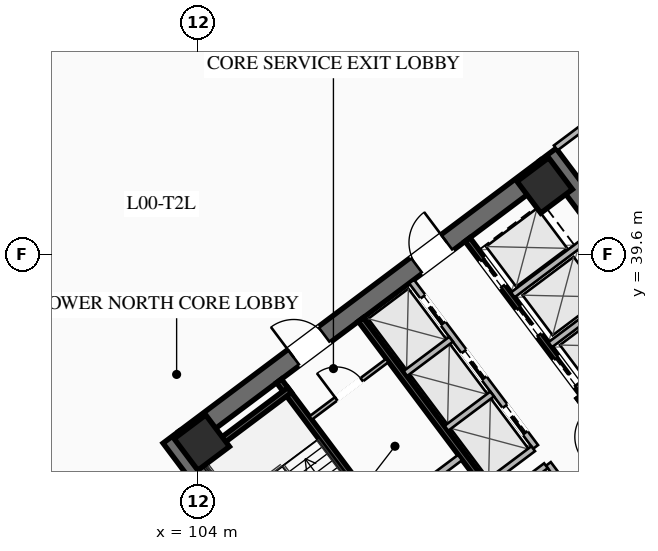
"""IFC4 building model, lengths in metres.
Left out: names, types, materials, properties, quantities, classifications, styles, units other than length and angle.
Written with IfcOpenShell. Run it as: python <this file> out.ifc"""

import sys

from ifc_helpers import new_model, si_unit, direction, frame, frame_2d, origin, origin_2d, place, context, subcontext, project, spatial, rectangle, hollow_rectangle, extrude, element, fill, save


model = new_model("IFC4")
c1 = context("Model", 3, precision=1e-05, world=origin(), true_north=direction((0.0, 1.0)))
c2 = subcontext(c1, "Body", "Model", "MODEL_VIEW")
j1 = project(units=[si_unit("LENGTHUNIT", "METRE"), si_unit("PLANEANGLEUNIT", "RADIAN")], contexts=[c1])
p1 = place(None, origin())
s1 = spatial("IfcSite", under=j1, at=p1, CompositionType="ELEMENT")
p2 = place(p1, origin())
s2 = spatial("IfcBuilding", under=s1, at=p2, CompositionType="ELEMENT")
p3 = place(p2, origin())
s3 = spatial("IfcBuildingStorey", under=s2, at=p3, CompositionType="ELEMENT", Elevation=0.0)
for number, where, z_axis, x_axis in (
    (1, (112.476, 21.107, 0.0), (0.0, 0.0, 1.0), (-0.6, 0.8, 0.0)),
    (2, (115.524, 42.893, 0.0), (0.0, 0.0, 1.0), (0.6, -0.8, 0.0)),
):
    element("IfcWall", number, at=place(p3, frame(where, z_axis=z_axis, x_axis=x_axis)), inside=s3, PredefinedType="SHEAR", context=c2, shape_type="SweptSolid", body=[
        extrude(rectangle(XDim=15.6, YDim=0.65, at=frame_2d((7.8, 0.0))), origin(), (0.0, 0.0, 1.0), 5.4),
    ])
p4 = place(p3, frame((103.571, 33.522, 0.0), z_axis=(0.0, 0.0, 1.0), x_axis=(0.799998028465, 0.600002628705, 0.0)))
e3 = element("IfcWall", 3, at=p4, inside=s3, PredefinedType="SHEAR", context=c2, shape_type="SweptSolid", body=[
    extrude(rectangle(XDim=14.86, YDim=0.65, at=frame_2d((7.43, 0.0))), origin(), (0.0, 0.0, 1.0), 5.4),
])
p5 = place(p4, frame((4.48, 0.0, 0.0)))
e4 = element("IfcOpeningElement", 4, at=p5, cuts=e3, PredefinedType="OPENING", context=c2, shape_type="SweptSolid", body=[
    extrude(rectangle(XDim=1.25, YDim=2.25, at=frame_2d((0.625, 1.125))), frame((0.0, 0.335, 0.0), z_axis=(0.0, -1.0, 0.0), x_axis=(1.0, 0.0, 0.0)), (0.0, 0.0, 1.0), 0.67),
])
p6 = place(p4, frame((9.53, 0.0, 0.0)))
e5 = element("IfcOpeningElement", 5, at=p6, cuts=e3, PredefinedType="OPENING", context=c2, shape_type="SweptSolid", body=[
    extrude(rectangle(XDim=1.25, YDim=2.25, at=frame_2d((0.625, 1.125))), frame((0.0, 0.335, 0.0), z_axis=(0.0, -1.0, 0.0), x_axis=(1.0, 0.0, 0.0)), (0.0, 0.0, 1.0), 0.67),
])
for number, where, z_axis, x_axis in (
    (6, (115.41, 41.87, 0.0), (0.0, 0.0, 1.0), (0.8, 0.6, 0.0)),
    (7, (104.13, 33.41, 0.0), (0.0, 0.0, 1.0), (0.8, 0.6, 0.0)),
):
    element("IfcColumn", number, at=place(p3, frame(where, z_axis=z_axis, x_axis=x_axis)), inside=s3, PredefinedType="COLUMN", context=c2, shape_type="SweptSolid", body=[
        extrude(hollow_rectangle(XDim=1.3, YDim=1.3, WallThickness=0.05, at=origin_2d()), origin(), (0.0, 0.0, 1.0), 5.14),
    ])
p7 = place(p3, frame((106.67, 35.44, 0.0), z_axis=(0.0, 0.0, 1.0), x_axis=(0.600009827119, -0.799992629566, 0.0)))
e8 = element("IfcWall", 8, at=p7, inside=s3, PredefinedType="SHEAR", context=c2, shape_type="SweptSolid", body=[
    extrude(rectangle(XDim=7.95, YDim=0.2, at=frame_2d((3.975, 0.0))), origin(), (0.0, 0.0, 1.0), 5.14),
])
p8 = place(p7, frame((6.3, 0.0, 0.0)))
e9 = element("IfcOpeningElement", 9, at=p8, cuts=e8, PredefinedType="OPENING", context=c2, shape_type="SweptSolid", body=[
    extrude(rectangle(XDim=1.15, YDim=2.2, at=frame_2d((0.575, 1.1))), frame((0.0, 0.11, 0.0), z_axis=(0.0, -1.0, 0.0), x_axis=(1.0, 0.0, 0.0)), (0.0, 0.0, 1.0), 0.22),
])
p9 = place(p3, frame((104.036, 32.902, 0.0), z_axis=(0.0, 0.0, 1.0), x_axis=(0.800039270442, 0.59994763584, 0.0)))
e10 = element("IfcWall", 10, at=p9, inside=s3, PredefinedType="SHEAR", context=c2, shape_type="SweptSolid", body=[
    extrude(rectangle(XDim=3.73, YDim=0.2, at=frame_2d((1.865, 0.0))), origin(), (0.0, 0.0, 1.0), 5.14),
])
p10 = place(p3, frame((121.33, 28.56, 0.0), z_axis=(0.0, 0.0, 1.0), x_axis=(-0.600009827119, 0.799992629566, 0.0)))
e11 = element("IfcWall", 11, at=p10, inside=s3, PredefinedType="SHEAR", context=c2, shape_type="SweptSolid", body=[
    extrude(rectangle(XDim=7.95, YDim=0.2, at=frame_2d((3.975, 0.0))), origin(), (0.0, 0.0, 1.0), 5.14),
])
p11 = place(p10, frame((6.3, 0.0, 0.0)))
e12 = element("IfcOpeningElement", 12, at=p11, cuts=e11, PredefinedType="OPENING", context=c2, shape_type="SweptSolid", body=[
    extrude(rectangle(XDim=1.15, YDim=2.2, at=frame_2d((0.575, 1.1))), frame((0.0, 0.11, 0.0), z_axis=(0.0, -1.0, 0.0), x_axis=(1.0, 0.0, 0.0)), (0.0, 0.0, 1.0), 0.22),
])
p12 = place(p3, frame((116.54, 34.78, 0.0), z_axis=(0.0, 0.0, 1.0), x_axis=(0.799984290658, 0.600020945218, 0.0)))
e13 = element("IfcWall", 13, at=p12, inside=s3, PredefinedType="SHEAR", context=c2, shape_type="SweptSolid", body=[
    extrude(rectangle(XDim=3.73, YDim=0.2, at=frame_2d((1.865, 0.0))), origin(), (0.0, 0.0, 1.0), 5.14),
])
p13 = place(p3, frame((117.938, 26.016, 0.0), z_axis=(0.0, 0.0, 1.0), x_axis=(-0.600005463273, 0.799995902516, 0.0)))
e14 = element("IfcWall", 14, at=p13, inside=s3, PredefinedType="SHEAR", context=c2, shape_type="SweptSolid", body=[
    extrude(rectangle(XDim=14.3, YDim=0.2, at=frame_2d((7.15, 0.0))), origin(), (0.0, 0.0, 1.0), 5.14),
])
p14 = place(p3, frame((110.104, 31.028, 0.0), z_axis=(0.0, 0.0, 1.0), x_axis=(0.800018601094, 0.59997519774, 0.0)))
e15 = element("IfcWall", 15, at=p14, inside=s3, PredefinedType="SOLIDWALL", context=c2, shape_type="SweptSolid", body=[
    extrude(rectangle(XDim=3.15, YDim=0.22, at=frame_2d((1.575, 0.0))), origin(), (0.0, 0.0, 1.0), 3.31),
])
p15 = place(p3, frame((112.87, 40.09, 0.0), z_axis=(0.0, 0.0, 1.0), x_axis=(0.599975393228, -0.800018454488, 0.0)))
e16 = element("IfcWall", 16, at=p15, inside=s3, PredefinedType="SHEAR", context=c2, shape_type="SweptSolid", body=[
    extrude(rectangle(XDim=6.35, YDim=0.2, at=frame_2d((3.175, 0.0))), origin(), (0.0, 0.0, 1.0), 5.14),
])
p16 = place(p15, frame((4.875, 0.0, 0.0)))
e17 = element("IfcOpeningElement", 17, at=p16, cuts=e16, PredefinedType="OPENING", context=c2, shape_type="SweptSolid", body=[
    extrude(rectangle(XDim=1.1, YDim=2.2, at=frame_2d((0.55, 1.1))), frame((0.0, 0.11, 0.0), z_axis=(0.0, -1.0, 0.0), x_axis=(1.0, 0.0, 0.0)), (0.0, 0.0, 1.0), 0.22),
])
p17 = place(p15, frame((2.825, 0.0, 0.0)))
e18 = element("IfcOpeningElement", 18, at=p17, cuts=e16, PredefinedType="OPENING", context=c2, shape_type="SweptSolid", body=[
    extrude(rectangle(XDim=1.1, YDim=2.2, at=frame_2d((0.55, 1.1))), frame((0.0, 0.11, 0.0), z_axis=(0.0, -1.0, 0.0), x_axis=(1.0, 0.0, 0.0)), (0.0, 0.0, 1.0), 0.22),
])
p18 = place(p15, frame((0.825, 0.0, 0.0)))
e19 = element("IfcOpeningElement", 19, at=p18, cuts=e16, PredefinedType="OPENING", context=c2, shape_type="SweptSolid", body=[
    extrude(rectangle(XDim=1.1, YDim=2.2, at=frame_2d((0.55, 1.1))), frame((0.0, 0.11, 0.0), z_axis=(0.0, -1.0, 0.0), x_axis=(1.0, 0.0, 0.0)), (0.0, 0.0, 1.0), 0.22),
])
for number, where, z_axis, x_axis in (
    (20, (115.59, 36.63, 0.0), (0.0, 0.0, 1.0), (0.8, 0.6, 0.0)),
    (21, (114.36, 38.27, 0.0), (0.0, 0.0, 1.0), (0.8, 0.6, 0.0)),
):
    element("IfcWall", number, at=place(p3, frame(where, z_axis=z_axis, x_axis=x_axis)), inside=s3, PredefinedType="SOLIDWALL", context=c2, shape_type="SweptSolid", body=[
        extrude(rectangle(XDim=3.38, YDim=0.2, at=frame_2d((1.69, 0.0))), origin(), (0.0, 0.0, 1.0), 5.14),
    ])
p19 = place(p3, frame((107.71, 34.22, 0.0), z_axis=(0.0, 0.0, 1.0), x_axis=(0.799981399002, 0.60002480053, 0.0)))
e22 = element("IfcWall", 22, at=p19, inside=s3, PredefinedType="PARTITIONING", context=c2, shape_type="SweptSolid", body=[
    extrude(rectangle(XDim=3.15, YDim=0.135, at=frame_2d((1.575, 0.0))), origin(), (0.0, 0.0, 1.0), 3.31),
])
p20 = place(p19, frame((1.05, 0.0, 0.0)))
e23 = element("IfcOpeningElement", 23, at=p20, cuts=e22, PredefinedType="OPENING", context=c2, shape_type="SweptSolid", body=[
    extrude(rectangle(XDim=1.05, YDim=2.2, at=frame_2d((0.525, 1.1))), frame((0.0, 0.077, 0.0), z_axis=(0.0, -1.0, 0.0), x_axis=(1.0, 0.0, 0.0)), (0.0, 0.0, 1.0), 0.155),
])
p21 = place(p3, frame((119.61, 27.27, 0.0), z_axis=(0.0, 0.0, 1.0), x_axis=(-0.600011488909, 0.79999138319, 0.0)))
e24 = element("IfcWall", 24, at=p21, inside=s3, PredefinedType="SOLIDWALL", context=c2, shape_type="SweptSolid", body=[
    extrude(rectangle(XDim=6.8, YDim=0.2, at=frame_2d((3.4, 0.0))), origin(), (0.0, 0.0, 1.0), 5.14),
])
p22 = place(p21, frame((0.625, 0.0, 0.0)))
e25 = element("IfcOpeningElement", 25, at=p22, cuts=e24, PredefinedType="OPENING", context=c2, shape_type="SweptSolid", body=[
    extrude(rectangle(XDim=1.1, YDim=2.2, at=frame_2d((0.55, 1.1))), frame((0.0, 0.11, 0.0), z_axis=(0.0, -1.0, 0.0), x_axis=(1.0, 0.0, 0.0)), (0.0, 0.0, 1.0), 0.22),
])
p23 = place(p21, frame((2.875, 0.0, 0.0)))
e26 = element("IfcOpeningElement", 26, at=p23, cuts=e24, PredefinedType="OPENING", context=c2, shape_type="SweptSolid", body=[
    extrude(rectangle(XDim=1.1, YDim=2.2, at=frame_2d((0.55, 1.1))), frame((0.0, 0.11, 0.0), z_axis=(0.0, -1.0, 0.0), x_axis=(1.0, 0.0, 0.0)), (0.0, 0.0, 1.0), 0.22),
])
p24 = place(p21, frame((5.125, 0.0, 0.0)))
e27 = element("IfcOpeningElement", 27, at=p24, cuts=e24, PredefinedType="OPENING", context=c2, shape_type="SweptSolid", body=[
    extrude(rectangle(XDim=1.1, YDim=2.2, at=frame_2d((0.55, 1.1))), frame((0.0, 0.11, 0.0), z_axis=(0.0, -1.0, 0.0), x_axis=(1.0, 0.0, 0.0)), (0.0, 0.0, 1.0), 0.22),
])
p25 = place(p3, frame((113.946, 31.522, 0.0), z_axis=(0.0, 0.0, 1.0), x_axis=(0.8, 0.6, 0.0)))
e28 = element("IfcWall", 28, at=p25, inside=s3, PredefinedType="SOLIDWALL", context=c2, shape_type="SweptSolid", body=[
    extrude(rectangle(XDim=1.88, YDim=0.2, at=frame_2d((0.94, 0.0))), origin(), (0.0, 0.0, 1.0), 5.14),
])
p26 = place(p3, frame((115.11, 33.27, 0.0), z_axis=(0.0, 0.0, 1.0), x_axis=(-0.600011488909, 0.79999138319, 0.0)))
e29 = element("IfcWall", 29, at=p26, inside=s3, PredefinedType="SOLIDWALL", context=c2, shape_type="SweptSolid", body=[
    extrude(rectangle(XDim=6.8, YDim=0.2, at=frame_2d((3.4, 0.0))), origin(), (0.0, 0.0, 1.0), 5.14),
])
p27 = place(p26, frame((0.575, 0.0, 0.0)))
e30 = element("IfcOpeningElement", 30, at=p27, cuts=e29, PredefinedType="OPENING", context=c2, shape_type="SweptSolid", body=[
    extrude(rectangle(XDim=1.1, YDim=2.2, at=frame_2d((0.55, 1.1))), frame((0.0, 0.11, 0.0), z_axis=(0.0, -1.0, 0.0), x_axis=(1.0, 0.0, 0.0)), (0.0, 0.0, 1.0), 0.22),
])
p28 = place(p26, frame((2.825, 0.0, 0.0)))
e31 = element("IfcOpeningElement", 31, at=p28, cuts=e29, PredefinedType="OPENING", context=c2, shape_type="SweptSolid", body=[
    extrude(rectangle(XDim=1.1, YDim=2.2, at=frame_2d((0.55, 1.1))), frame((0.0, 0.11, 0.0), z_axis=(0.0, -1.0, 0.0), x_axis=(1.0, 0.0, 0.0)), (0.0, 0.0, 1.0), 0.22),
])
p29 = place(p26, frame((5.075, 0.0, 0.0)))
e32 = element("IfcOpeningElement", 32, at=p29, cuts=e29, PredefinedType="OPENING", context=c2, shape_type="SweptSolid", body=[
    extrude(rectangle(XDim=1.1, YDim=2.2, at=frame_2d((0.55, 1.1))), frame((0.0, 0.11, 0.0), z_axis=(0.0, -1.0, 0.0), x_axis=(1.0, 0.0, 0.0)), (0.0, 0.0, 1.0), 0.22),
])
p30 = place(p3, frame((113.526, 32.082, 0.0), z_axis=(0.0, 0.0, 1.0), x_axis=(0.800046745961, 0.599937666993, 0.0)))
e33 = element("IfcWall", 33, at=p30, inside=s3, PredefinedType="SOLIDWALL", context=c2, shape_type="SweptSolid", body=[
    extrude(rectangle(XDim=1.88, YDim=0.2, at=frame_2d((0.94, 0.0))), origin(), (0.0, 0.0, 1.0), 5.14),
])
p31 = place(p3, frame((112.176, 33.882, 0.0), z_axis=(0.0, 0.0, 1.0), x_axis=(0.8, 0.6, 0.0)))
e34 = element("IfcWall", 34, at=p31, inside=s3, PredefinedType="SOLIDWALL", context=c2, shape_type="SweptSolid", body=[
    extrude(rectangle(XDim=1.88, YDim=0.2, at=frame_2d((0.94, 0.0))), origin(), (0.0, 0.0, 1.0), 5.14),
])
p32 = place(p3, frame((110.826, 35.682, 0.0), z_axis=(0.0, 0.0, 1.0), x_axis=(0.799984418148, 0.600020775241, 0.0)))
e35 = element("IfcWall", 35, at=p32, inside=s3, PredefinedType="SOLIDWALL", context=c2, shape_type="SweptSolid", body=[
    extrude(rectangle(XDim=1.88, YDim=0.2, at=frame_2d((0.94, 0.0))), origin(), (0.0, 0.0, 1.0), 5.14),
])
p33 = place(p3, frame((115.772, 43.104, 0.0), z_axis=(0.0, 0.0, 1.0), x_axis=(0.800016739359, 0.599977680206, 0.0)))
e36 = element("IfcWall", 36, at=p33, inside=s3, PredefinedType="SOLIDWALL", context=c2, shape_type="SweptSolid", body=[
    extrude(rectangle(XDim=1.75, YDim=0.2, at=frame_2d((0.875, 0.0))), origin(), (0.0, 0.0, 1.0), 3.31),
])
p34 = place(p5, origin())
e37 = element("IfcDoor", 37, at=p34, inside=s3, OperationType="SINGLE_SWING_LEFT", PredefinedType="DOOR", context=c2, shape_type="SweptSolid", body=[
    extrude(rectangle(XDim=1.25, YDim=2.25, at=frame_2d((0.625, 1.125))), frame((0.0, 0.025, 0.0), z_axis=(0.0, -1.0, 0.0), x_axis=(1.0, 0.0, 0.0)), (0.0, 0.0, 1.0), 0.05),
])
fill(e4, e37)
p35 = place(p6, origin())
e38 = element("IfcDoor", 38, at=p35, inside=s3, OperationType="SINGLE_SWING_RIGHT", PredefinedType="DOOR", context=c2, shape_type="SweptSolid", body=[
    extrude(rectangle(XDim=1.25, YDim=2.25, at=frame_2d((0.625, 1.125))), frame((0.0, 0.025, 0.0), z_axis=(0.0, -1.0, 0.0), x_axis=(1.0, 0.0, 0.0)), (0.0, 0.0, 1.0), 0.05),
])
fill(e5, e38)
p36 = place(p20, origin())
e39 = element("IfcDoor", 39, at=p36, inside=s3, OperationType="SINGLE_SWING_LEFT", PredefinedType="DOOR", context=c2, shape_type="SweptSolid", body=[
    extrude(rectangle(XDim=1.05, YDim=2.2, at=frame_2d((0.525, 1.1))), frame((0.0, 0.025, 0.0), z_axis=(0.0, -1.0, 0.0), x_axis=(1.0, 0.0, 0.0)), (0.0, 0.0, 1.0), 0.05),
])
fill(e23, e39)
p37 = place(p27, origin())
e40 = element("IfcDoor", 40, at=p37, inside=s3, OperationType="SLIDING_TO_LEFT", PredefinedType="DOOR", context=c2, shape_type="SweptSolid", body=[
    extrude(rectangle(XDim=1.1, YDim=2.2, at=frame_2d((0.55, 1.1))), frame((0.0, 0.025, 0.0), z_axis=(0.0, -1.0, 0.0), x_axis=(1.0, 0.0, 0.0)), (0.0, 0.0, 1.0), 0.05),
])
fill(e30, e40)
p38 = place(p28, origin())
e41 = element("IfcDoor", 41, at=p38, inside=s3, OperationType="SLIDING_TO_LEFT", PredefinedType="DOOR", context=c2, shape_type="SweptSolid", body=[
    extrude(rectangle(XDim=1.1, YDim=2.2, at=frame_2d((0.55, 1.1))), frame((0.0, 0.025, 0.0), z_axis=(0.0, -1.0, 0.0), x_axis=(1.0, 0.0, 0.0)), (0.0, 0.0, 1.0), 0.05),
])
fill(e31, e41)
p39 = place(p29, origin())
e42 = element("IfcDoor", 42, at=p39, inside=s3, OperationType="SLIDING_TO_LEFT", PredefinedType="DOOR", context=c2, shape_type="SweptSolid", body=[
    extrude(rectangle(XDim=1.1, YDim=2.2, at=frame_2d((0.55, 1.1))), frame((0.0, 0.025, 0.0), z_axis=(0.0, -1.0, 0.0), x_axis=(1.0, 0.0, 0.0)), (0.0, 0.0, 1.0), 0.05),
])
fill(e32, e42)
p40 = place(p16, origin())
e43 = element("IfcDoor", 43, at=p40, inside=s3, OperationType="SLIDING_TO_LEFT", PredefinedType="DOOR", context=c2, shape_type="SweptSolid", body=[
    extrude(rectangle(XDim=1.1, YDim=2.2, at=frame_2d((0.55, 1.1))), frame((0.0, 0.025, 0.0), z_axis=(0.0, -1.0, 0.0), x_axis=(1.0, 0.0, 0.0)), (0.0, 0.0, 1.0), 0.05),
])
fill(e17, e43)
p41 = place(p17, origin())
e44 = element("IfcDoor", 44, at=p41, inside=s3, OperationType="SLIDING_TO_LEFT", PredefinedType="DOOR", context=c2, shape_type="SweptSolid", body=[
    extrude(rectangle(XDim=1.1, YDim=2.2, at=frame_2d((0.55, 1.1))), frame((0.0, 0.025, 0.0), z_axis=(0.0, -1.0, 0.0), x_axis=(1.0, 0.0, 0.0)), (0.0, 0.0, 1.0), 0.05),
])
fill(e18, e44)
p42 = place(p18, origin())
e45 = element("IfcDoor", 45, at=p42, inside=s3, OperationType="SLIDING_TO_LEFT", PredefinedType="DOOR", context=c2, shape_type="SweptSolid", body=[
    extrude(rectangle(XDim=1.1, YDim=2.2, at=frame_2d((0.55, 1.1))), frame((0.0, 0.025, 0.0), z_axis=(0.0, -1.0, 0.0), x_axis=(1.0, 0.0, 0.0)), (0.0, 0.0, 1.0), 0.05),
])
fill(e19, e45)
save(model, sys.argv[1])
